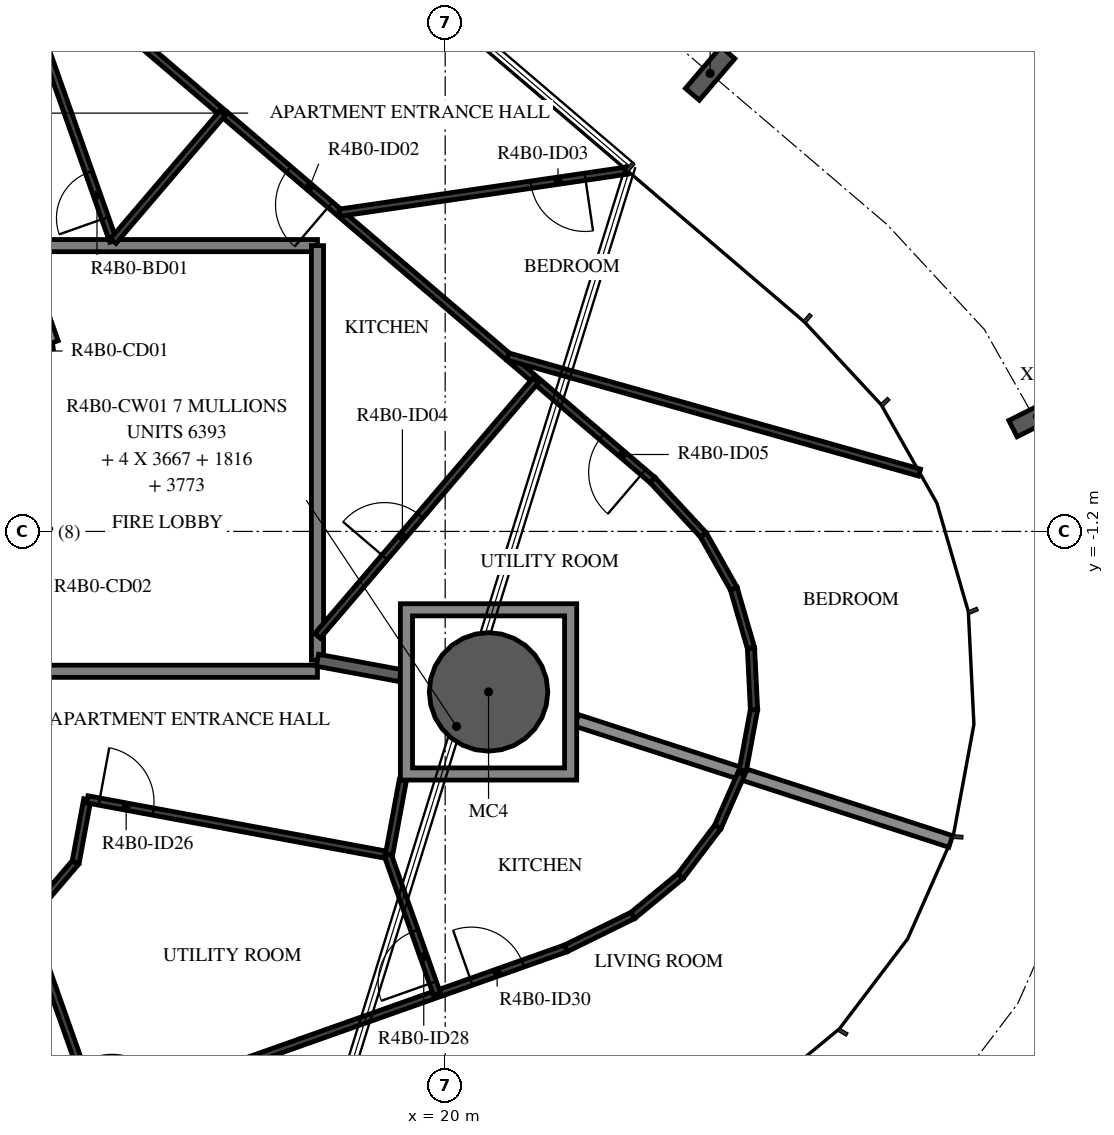
"""IFC4 building model, lengths in metres.
Left out: names, types, materials, properties, quantities, classifications, styles, units other than length and angle.
Written with IfcOpenShell. Run it as: python <this file> out.ifc"""

import sys

from ifc_helpers import new_model, si_unit, direction, frame, frame_2d, origin, origin_2d, place, context, subcontext, project, spatial, polyline, rectangle, hollow_circle, i_section, outline, extrude, element, fill, save


model = new_model("IFC4")
c1 = context("Model", 3, precision=1e-05, world=origin(), true_north=direction((0.0, 1.0)))
c2 = subcontext(c1, "Body", "Model", "MODEL_VIEW")
j1 = project(units=[si_unit("LENGTHUNIT", "METRE"), si_unit("PLANEANGLEUNIT", "RADIAN")], contexts=[c1])
p1 = place(None, origin())
s1 = spatial("IfcSite", under=j1, at=p1, CompositionType="ELEMENT")
p2 = place(p1, origin())
s2 = spatial("IfcBuilding", under=s1, at=p2, CompositionType="ELEMENT")
p3 = place(p2, frame((0.0, 0.0, 165.7)))
s3 = spatial("IfcBuildingStorey", under=s2, at=p3, CompositionType="ELEMENT", Elevation=165.7)
p4 = place(p3, frame((20.713, -3.839, -0.38), z_axis=(0.0, 0.0, 1.0), x_axis=(1.0, 0.0, 0.0)))
e1 = element("IfcColumn", 1, at=p4, inside=s3, PredefinedType="COLUMN", context=c2, shape_type="SweptSolid", body=[
    extrude(hollow_circle(Radius=0.975, WallThickness=0.045, at=origin_2d()), origin(), (0.0, 0.0, 1.0), 3.5),
])
for number, where, z_axis, x_axis in (
    (2, (29.74, 0.692, -0.38), (0.0, 0.0, 1.0), (0.449, -0.894, 0.0)),
    (3, (24.358, 6.331, -0.38), (0.0, 0.0, 1.0), (0.76, -0.649, 0.0)),
):
    element("IfcColumn", number, at=place(p3, frame(where, z_axis=z_axis, x_axis=x_axis)), inside=s3, PredefinedType="COLUMN", context=c2, shape_type="SweptSolid", body=[
        extrude(i_section(OverallWidth=0.3, OverallDepth=0.9, WebThickness=0.019, FlangeThickness=0.035, FilletRadius=0.03, at=origin_2d()), origin(), (0.0, 0.0, 1.0), 3.5),
    ])
p5 = place(p3, frame((11.87, 1.668, 0.0), z_axis=(0.0, 0.0, 1.0), x_axis=(0.990270910415, 0.139152879904, 0.0)))
e4 = element("IfcWall", 4, at=p5, inside=s3, PredefinedType="STANDARD", context=c2, shape_type="SweptSolid", body=[
    extrude(rectangle(XDim=1.688, YDim=0.2, at=frame_2d((0.844, 0.0))), origin(), (0.0, 0.0, 1.0), 3.12),
])
p6 = place(p5, frame((0.11, 0.0, 0.0)))
e5 = element("IfcOpeningElement", 5, at=p6, cuts=e4, PredefinedType="OPENING", context=c2, shape_type="SweptSolid", body=[
    extrude(rectangle(XDim=1.2, YDim=2.1, at=frame_2d((0.6, 1.05))), frame((0.0, 0.11, 0.0), z_axis=(0.0, -1.0, 0.0), x_axis=(1.0, 0.0, 0.0)), (0.0, 0.0, 1.0), 0.22),
])
p7 = place(p3, frame((13.542, 1.903, 0.0), z_axis=(0.0, 0.0, 1.0), x_axis=(-0.333808508206, 0.942640907159, 0.0)))
e6 = element("IfcWall", 6, at=p7, inside=s3, PredefinedType="STANDARD", context=c2, shape_type="SweptSolid", body=[
    extrude(rectangle(XDim=6.317, YDim=0.2, at=frame_2d((3.158, 0.0))), origin(), (0.0, 0.0, 1.0), 3.12),
])
p8 = place(p3, frame((17.9, 3.5, 0.0), z_axis=(0.0, 0.0, 1.0), x_axis=(-1.0, 0.0, 0.0)))
e7 = element("IfcWall", 7, at=p8, inside=s3, PredefinedType="STANDARD", context=c2, shape_type="SweptSolid", body=[
    extrude(rectangle(XDim=4.924, YDim=0.2, at=frame_2d((2.462, 0.0))), origin(), (0.0, 0.0, 1.0), 3.12),
])
p9 = place(p3, frame((17.9, -3.318, 0.0), z_axis=(0.0, 0.0, 1.0), x_axis=(0.0, 1.0, 0.0)))
e8 = element("IfcWall", 8, at=p9, inside=s3, PredefinedType="STANDARD", context=c2, shape_type="SweptSolid", body=[
    extrude(rectangle(XDim=6.818, YDim=0.2, at=frame_2d((3.409, 0.0))), origin(), (0.0, 0.0, 1.0), 3.12),
])
p10 = place(p3, frame((12.979, -3.5, 0.0), z_axis=(0.0, 0.0, 1.0), x_axis=(1.0, 0.0, 0.0)))
e9 = element("IfcWall", 9, at=p10, inside=s3, PredefinedType="STANDARD", context=c2, shape_type="SweptSolid", body=[
    extrude(rectangle(XDim=4.92, YDim=0.2, at=frame_2d((2.46, 0.0))), origin(), (0.0, 0.0, 1.0), 3.12),
])
p11 = place(p3, frame((17.9, -3.319, 0.0), z_axis=(0.0, 0.0, 1.0), x_axis=(0.983246950753, -0.182278451375, 0.0)))
e10 = element("IfcWall", 10, at=p11, inside=s3, PredefinedType="STANDARD", context=c2, shape_type="SweptSolid", body=[
    extrude(rectangle(XDim=1.386, YDim=0.2, at=frame_2d((0.693, 0.0))), origin(), (0.0, 0.0, 1.0), 3.12),
])
p12 = place(p3, frame((22.163, -4.308, 0.0), z_axis=(0.0, 0.0, 1.0), x_axis=(0.951422718769, -0.307887658426, 0.0)))
e11 = element("IfcWall", 11, at=p12, inside=s3, PredefinedType="STANDARD", context=c2, shape_type="SweptSolid", body=[
    extrude(rectangle(XDim=6.464, YDim=0.2, at=frame_2d((3.232, 0.0))), origin(), (0.0, 0.0, 1.0), 2.73),
])
p13 = place(p3, frame((14.541, 3.575, 0.0), z_axis=(0.0, 0.0, 1.0), x_axis=(-0.333799280318, 0.942644174893, 0.0)))
e12 = element("IfcWall", 12, at=p13, inside=s3, PredefinedType="PARTITIONING", context=c2, shape_type="SweptSolid", body=[
    extrude(rectangle(XDim=5.477, YDim=0.12, at=frame_2d((2.738, 0.0))), origin(), (0.0, 0.0, 1.0), 3.12),
])
p14 = place(p13, frame((0.4, 0.0, 0.0)))
e13 = element("IfcOpeningElement", 13, at=p14, cuts=e12, PredefinedType="OPENING", context=c2, shape_type="SweptSolid", body=[
    extrude(rectangle(XDim=0.8, YDim=2.1, at=frame_2d((0.4, 1.05))), frame((0.0, 0.07, 0.0), z_axis=(0.0, -1.0, 0.0), x_axis=(1.0, 0.0, 0.0)), (0.0, 0.0, 1.0), 0.14),
])
p15 = place(p3, frame((12.734, 8.762, 0.0), z_axis=(0.0, 0.0, 1.0), x_axis=(0.760390484255, -0.649466174219, 0.0)))
e14 = element("IfcWall", 14, at=p15, inside=s3, PredefinedType="PARTITIONING", context=c2, shape_type="SweptSolid", body=[
    extrude(rectangle(XDim=4.783, YDim=0.12, at=frame_2d((2.391, 0.0))), origin(), (0.0, 0.0, 1.0), 3.12),
])
p16 = place(p3, frame((23.411, -0.357, 0.0), z_axis=(0.0, 0.0, 1.0), x_axis=(-0.76041871148, 0.649433124525, 0.0)))
e15 = element("IfcWall", 15, at=p16, inside=s3, PredefinedType="PARTITIONING", context=c2, shape_type="SweptSolid", body=[
    extrude(rectangle(XDim=9.259, YDim=0.12, at=frame_2d((4.629, 0.0))), origin(), (0.0, 0.0, 1.0), 3.12),
])
p17 = place(p16, frame((6.972, 0.0, 0.0)))
e16 = element("IfcOpeningElement", 16, at=p17, cuts=e15, PredefinedType="OPENING", context=c2, shape_type="SweptSolid", body=[
    extrude(rectangle(XDim=0.9, YDim=2.1, at=frame_2d((0.45, 1.05))), frame((0.0, 0.07, 0.0), z_axis=(0.0, -1.0, 0.0), x_axis=(1.0, 0.0, 0.0)), (0.0, 0.0, 1.0), 0.14),
])
p18 = place(p16, frame((0.2, 0.0, 0.0)))
e17 = element("IfcOpeningElement", 17, at=p18, cuts=e15, PredefinedType="OPENING", context=c2, shape_type="SweptSolid", body=[
    extrude(rectangle(XDim=0.9, YDim=2.1, at=frame_2d((0.45, 1.05))), frame((0.0, 0.07, 0.0), z_axis=(0.0, -1.0, 0.0), x_axis=(1.0, 0.0, 0.0)), (0.0, 0.0, 1.0), 0.14),
])
p19 = place(p3, frame((16.341, 5.682, 0.0), z_axis=(0.0, 0.0, 1.0), x_axis=(-0.64946993237, -0.76038727432, 0.0)))
e18 = element("IfcWall", 18, at=p19, inside=s3, PredefinedType="PARTITIONING", context=c2, shape_type="SweptSolid", body=[
    extrude(rectangle(XDim=2.771, YDim=0.12, at=frame_2d((1.386, 0.0))), origin(), (0.0, 0.0, 1.0), 3.12),
])
p20 = place(p3, frame((17.9, -2.918, 0.0), z_axis=(0.0, 0.0, 1.0), x_axis=(0.649469887983, 0.760387312232, 0.0)))
e19 = element("IfcWall", 19, at=p20, inside=s3, PredefinedType="PARTITIONING", context=c2, shape_type="SweptSolid", body=[
    extrude(rectangle(XDim=5.527, YDim=0.12, at=frame_2d((2.763, 0.0))), origin(), (0.0, 0.0, 1.0), 3.12),
])
p21 = place(p20, frame((1.7, 0.0, 0.0)))
e20 = element("IfcOpeningElement", 20, at=p21, cuts=e19, PredefinedType="OPENING", context=c2, shape_type="SweptSolid", body=[
    extrude(rectangle(XDim=0.9, YDim=2.1, at=frame_2d((0.45, 1.05))), frame((0.0, 0.07, 0.0), z_axis=(0.0, -1.0, 0.0), x_axis=(1.0, 0.0, 0.0)), (0.0, 0.0, 1.0), 0.14),
])
p22 = place(p3, frame((22.994, 4.734, 0.0), z_axis=(0.0, 0.0, 1.0), x_axis=(-0.989449286977, -0.144879634529, 0.0)))
e21 = element("IfcWall", 21, at=p22, inside=s3, PredefinedType="PARTITIONING", context=c2, shape_type="SweptSolid", body=[
    extrude(rectangle(XDim=4.782, YDim=0.12, at=frame_2d((2.391, 0.0))), origin(), (0.0, 0.0, 1.0), 3.12),
])
p23 = place(p22, frame((0.7, 0.0, 0.0)))
e22 = element("IfcOpeningElement", 22, at=p23, cuts=e21, PredefinedType="OPENING", context=c2, shape_type="SweptSolid", body=[
    extrude(rectangle(XDim=0.9, YDim=2.1, at=frame_2d((0.45, 1.05))), frame((0.0, 0.07, 0.0), z_axis=(0.0, -1.0, 0.0), x_axis=(1.0, 0.0, 0.0)), (0.0, 0.0, 1.0), 0.14),
])
p24 = place(p3, frame((21.029, 1.677, 0.0), z_axis=(0.0, 0.0, 1.0), x_axis=(0.962458274539, -0.271429677396, 0.0)))
e23 = element("IfcWall", 23, at=p24, inside=s3, PredefinedType="PARTITIONING", context=c2, shape_type="SweptSolid", body=[
    extrude(rectangle(XDim=7.037, YDim=0.12, at=frame_2d((3.519, 0.0))), origin(), (0.0, 0.0, 1.0), 3.12),
])
for number, where, z_axis, x_axis in (
    (24, (24.894, -5.131, 0.0), (0.0, 0.0, 1.0), (0.182, 0.983, 0.0)),
    (25, (25.079, -4.132, 0.0), (0.0, 0.0, 1.0), (-0.049, 0.999, 0.0)),
):
    element("IfcWall", number, at=place(p3, frame(where, z_axis=z_axis, x_axis=x_axis)), inside=s3, PredefinedType="PARTITIONING", context=c2, shape_type="SweptSolid", body=[
        extrude(rectangle(XDim=1.016, YDim=0.12, at=frame_2d((0.508, 0.0))), origin(), (0.0, 0.0, 1.0), 3.12),
    ])
for number, where, z_axis, x_axis in (
    (26, (25.029, -3.117, 0.0), (0.0, 0.0, 1.0), (-0.279, 0.96, 0.0)),
    (27, (24.746, -2.141, 0.0), (0.0, 0.0, 1.0), (-0.492, 0.87, 0.0)),
):
    element("IfcWall", number, at=place(p3, frame(where, z_axis=z_axis, x_axis=x_axis)), inside=s3, PredefinedType="PARTITIONING", context=c2, shape_type="SweptSolid", body=[
        extrude(rectangle(XDim=1.016, YDim=0.12, at=frame_2d((0.508, 0.0))), origin(), (0.0, 0.0, 1.0), 3.12),
    ])
p25 = place(p3, frame((24.246, -1.257, 0.0), z_axis=(0.0, 0.0, 1.0), x_axis=(-0.679840361176, 0.733360132074, 0.0)))
e28 = element("IfcWall", 28, at=p25, inside=s3, PredefinedType="PARTITIONING", context=c2, shape_type="SweptSolid", body=[
    extrude(rectangle(XDim=1.227, YDim=0.12, at=frame_2d((0.614, 0.0))), origin(), (0.0, 0.0, 1.0), 3.12),
])
p26 = place(p3, frame((8.737, -12.713, 0.0), z_axis=(0.0, 0.0, 1.0), x_axis=(0.649430604754, 0.760420863476, 0.0)))
e29 = element("IfcWall", 29, at=p26, inside=s3, PredefinedType="PARTITIONING", context=c2, shape_type="SweptSolid", body=[
    extrude(rectangle(XDim=7.985, YDim=0.12, at=frame_2d((3.992, 0.0))), origin(), (0.0, 0.0, 1.0), 3.12),
])
p27 = place(p26, frame((1.4, 0.0, 0.0)))
e30 = element("IfcOpeningElement", 30, at=p27, cuts=e29, PredefinedType="OPENING", context=c2, shape_type="SweptSolid", body=[
    extrude(rectangle(XDim=0.8, YDim=2.1, at=frame_2d((0.4, 1.05))), frame((0.0, 0.07, 0.0), z_axis=(0.0, -1.0, 0.0), x_axis=(1.0, 0.0, 0.0)), (0.0, 0.0, 1.0), 0.14),
])
p28 = place(p3, frame((13.923, -6.641, 0.0), z_axis=(0.0, 0.0, 1.0), x_axis=(0.182396711264, 0.983225019881, 0.0)))
e31 = element("IfcWall", 31, at=p28, inside=s3, PredefinedType="PARTITIONING", context=c2, shape_type="SweptSolid", body=[
    extrude(rectangle(XDim=1.052, YDim=0.12, at=frame_2d((0.526, 0.0))), origin(), (0.0, 0.0, 1.0), 3.12),
])
p29 = place(p3, frame((14.115, -5.606, 0.0), z_axis=(0.0, 0.0, 1.0), x_axis=(0.983252350103, -0.182249323775, 0.0)))
e32 = element("IfcWall", 32, at=p29, inside=s3, PredefinedType="PARTITIONING", context=c2, shape_type="SweptSolid", body=[
    extrude(rectangle(XDim=5.025, YDim=0.12, at=frame_2d((2.512, 0.0))), origin(), (0.0, 0.0, 1.0), 3.12),
])
p30 = place(p29, frame((0.2, 0.0, 0.0)))
e33 = element("IfcOpeningElement", 33, at=p30, cuts=e32, PredefinedType="OPENING", context=c2, shape_type="SweptSolid", body=[
    extrude(rectangle(XDim=0.9, YDim=2.1, at=frame_2d((0.45, 1.05))), frame((0.0, 0.07, 0.0), z_axis=(0.0, -1.0, 0.0), x_axis=(1.0, 0.0, 0.0)), (0.0, 0.0, 1.0), 0.14),
])
p31 = place(p3, frame((19.075, -6.526, 0.0), z_axis=(0.0, 0.0, 1.0), x_axis=(0.182283897093, 0.983245941187, 0.0)))
e34 = element("IfcWall", 34, at=p31, inside=s3, PredefinedType="PARTITIONING", context=c2, shape_type="SweptSolid", body=[
    extrude(rectangle(XDim=1.258, YDim=0.12, at=frame_2d((0.629, 0.0))), origin(), (0.0, 0.0, 1.0), 3.12),
])
p32 = place(p3, frame((14.277, -10.786, 0.0), z_axis=(0.0, 0.0, 1.0), x_axis=(-0.333865646111, 0.942620671504, 0.0)))
e35 = element("IfcWall", 35, at=p32, inside=s3, PredefinedType="PARTITIONING", context=c2, shape_type="SweptSolid", body=[
    extrude(rectangle(XDim=3.419, YDim=0.12, at=frame_2d((1.71, 0.0))), origin(), (0.0, 0.0, 1.0), 3.12),
])
p33 = place(p3, frame((14.239, -10.799, 0.0), z_axis=(0.0, 0.0, 1.0), x_axis=(0.94264202959, 0.333805338558, 0.0)))
e36 = element("IfcWall", 36, at=p33, inside=s3, PredefinedType="PARTITIONING", context=c2, shape_type="SweptSolid", body=[
    extrude(rectangle(XDim=8.216, YDim=0.12, at=frame_2d((4.108, 0.0))), origin(), (0.0, 0.0, 1.0), 3.12),
])
p34 = place(p33, frame((0.3, 0.0, 0.0)))
e37 = element("IfcOpeningElement", 37, at=p34, cuts=e36, PredefinedType="OPENING", context=c2, shape_type="SweptSolid", body=[
    extrude(rectangle(XDim=0.9, YDim=2.1, at=frame_2d((0.45, 1.05))), frame((0.0, 0.07, 0.0), z_axis=(0.0, -1.0, 0.0), x_axis=(1.0, 0.0, 0.0)), (0.0, 0.0, 1.0), 0.14),
])
p35 = place(p33, frame((6.568, 0.0, 0.0)))
e38 = element("IfcOpeningElement", 38, at=p35, cuts=e36, PredefinedType="OPENING", context=c2, shape_type="SweptSolid", body=[
    extrude(rectangle(XDim=0.9, YDim=2.1, at=frame_2d((0.45, 1.05))), frame((0.0, 0.07, 0.0), z_axis=(0.0, -1.0, 0.0), x_axis=(1.0, 0.0, 0.0)), (0.0, 0.0, 1.0), 0.14),
])
p36 = place(p3, frame((19.865, -8.807, 0.0), z_axis=(0.0, 0.0, 1.0), x_axis=(-0.33378934261, 0.942647693871, 0.0)))
e39 = element("IfcWall", 39, at=p36, inside=s3, PredefinedType="PARTITIONING", context=c2, shape_type="SweptSolid", body=[
    extrude(rectangle(XDim=2.424, YDim=0.12, at=frame_2d((1.212, 0.0))), origin(), (0.0, 0.0, 1.0), 3.12),
])
p37 = place(p36, frame((0.2, 0.0, 0.0)))
e40 = element("IfcOpeningElement", 40, at=p37, cuts=e39, PredefinedType="OPENING", context=c2, shape_type="SweptSolid", body=[
    extrude(rectangle(XDim=0.9, YDim=2.1, at=frame_2d((0.45, 1.05))), frame((0.0, 0.07, 0.0), z_axis=(0.0, -1.0, 0.0), x_axis=(1.0, 0.0, 0.0)), (0.0, 0.0, 1.0), 0.14),
])
p38 = place(p3, frame((24.87, -5.184, 0.0), z_axis=(0.0, 0.0, 1.0), x_axis=(-0.404173771344, -0.914682219439, 0.0)))
e41 = element("IfcWall", 41, at=p38, inside=s3, PredefinedType="PARTITIONING", context=c2, shape_type="SweptSolid", body=[
    extrude(rectangle(XDim=0.958, YDim=0.12, at=frame_2d((0.479, 0.0))), origin(), (0.0, 0.0, 1.0), 3.12),
])
for number, where, z_axis, x_axis in (
    (42, (24.483, -6.06, 0.0), (0.0, 0.0, 1.0), (-0.604, -0.797, 0.0)),
    (43, (23.869, -6.869, 0.0), (0.0, 0.0, 1.0), (-0.772, -0.636, 0.0)),
):
    element("IfcWall", number, at=place(p3, frame(where, z_axis=z_axis, x_axis=x_axis)), inside=s3, PredefinedType="PARTITIONING", context=c2, shape_type="SweptSolid", body=[
        extrude(rectangle(XDim=1.016, YDim=0.12, at=frame_2d((0.508, 0.0))), origin(), (0.0, 0.0, 1.0), 3.12),
    ])
p39 = place(p3, frame((23.085, -7.515, 0.0), z_axis=(0.0, 0.0, 1.0), x_axis=(-0.897431337015, -0.441154162786, 0.0)))
e44 = element("IfcWall", 44, at=p39, inside=s3, PredefinedType="PARTITIONING", context=c2, shape_type="SweptSolid", body=[
    extrude(rectangle(XDim=1.227, YDim=0.12, at=frame_2d((0.613, 0.0))), origin(), (0.0, 0.0, 1.0), 3.12),
])
p40 = place(p3, origin())
e45 = element("IfcWall", 45, at=p40, inside=s3, PredefinedType="STANDARD", context=c2, shape_type="SweptSolid", body=[
    extrude(outline(polyline([(22.163, -2.389), (22.163, -5.289), (19.263, -5.289), (19.263, -2.389), (22.163, -2.389)]), holes=[polyline([(19.463, -5.089), (21.963, -5.089), (21.963, -2.589), (19.463, -2.589), (19.463, -5.089)])]), origin(), (0.0, 0.0, 1.0), 3.12),
])
p41 = place(p14, origin())
e46 = element("IfcDoor", 46, at=p41, inside=s3, OperationType="SINGLE_SWING_LEFT", PredefinedType="DOOR", context=c2, shape_type="SweptSolid", body=[
    extrude(rectangle(XDim=0.8, YDim=2.1, at=frame_2d((0.4, 1.05))), frame((0.0, 0.025, 0.0), z_axis=(0.0, -1.0, 0.0), x_axis=(1.0, 0.0, 0.0)), (0.0, 0.0, 1.0), 0.05),
])
fill(e13, e46)
p42 = place(p17, origin())
e47 = element("IfcDoor", 47, at=p42, inside=s3, OperationType="SINGLE_SWING_RIGHT", PredefinedType="DOOR", context=c2, shape_type="SweptSolid", body=[
    extrude(rectangle(XDim=0.9, YDim=2.1, at=frame_2d((0.45, 1.05))), frame((0.0, 0.025, 0.0), z_axis=(0.0, -1.0, 0.0), x_axis=(1.0, 0.0, 0.0)), (0.0, 0.0, 1.0), 0.05),
])
fill(e16, e47)
p43 = place(p23, origin())
e48 = element("IfcDoor", 48, at=p43, inside=s3, OperationType="SINGLE_SWING_LEFT", PredefinedType="DOOR", context=c2, shape_type="SweptSolid", body=[
    extrude(rectangle(XDim=0.9, YDim=2.1, at=frame_2d((0.45, 1.05))), frame((0.0, 0.025, 0.0), z_axis=(0.0, -1.0, 0.0), x_axis=(1.0, 0.0, 0.0)), (0.0, 0.0, 1.0), 0.05),
])
fill(e22, e48)
p44 = place(p21, origin())
e49 = element("IfcDoor", 49, at=p44, inside=s3, OperationType="SINGLE_SWING_LEFT", PredefinedType="DOOR", context=c2, shape_type="SweptSolid", body=[
    extrude(rectangle(XDim=0.9, YDim=2.1, at=frame_2d((0.45, 1.05))), frame((0.0, 0.025, 0.0), z_axis=(0.0, -1.0, 0.0), x_axis=(1.0, 0.0, 0.0)), (0.0, 0.0, 1.0), 0.05),
])
fill(e20, e49)
p45 = place(p18, origin())
e50 = element("IfcDoor", 50, at=p45, inside=s3, OperationType="SINGLE_SWING_LEFT", PredefinedType="DOOR", context=c2, shape_type="SweptSolid", body=[
    extrude(rectangle(XDim=0.9, YDim=2.1, at=frame_2d((0.45, 1.05))), frame((0.0, 0.025, 0.0), z_axis=(0.0, -1.0, 0.0), x_axis=(1.0, 0.0, 0.0)), (0.0, 0.0, 1.0), 0.05),
])
fill(e17, e50)
p46 = place(p30, origin())
e51 = element("IfcDoor", 51, at=p46, inside=s3, OperationType="SINGLE_SWING_RIGHT", PredefinedType="DOOR", context=c2, shape_type="SweptSolid", body=[
    extrude(rectangle(XDim=0.9, YDim=2.1, at=frame_2d((0.45, 1.05))), frame((0.0, 0.025, 0.0), z_axis=(0.0, -1.0, 0.0), x_axis=(1.0, 0.0, 0.0)), (0.0, 0.0, 1.0), 0.05),
])
fill(e33, e51)
p47 = place(p37, origin())
e52 = element("IfcDoor", 52, at=p47, inside=s3, OperationType="SINGLE_SWING_RIGHT", PredefinedType="DOOR", context=c2, shape_type="SweptSolid", body=[
    extrude(rectangle(XDim=0.9, YDim=2.1, at=frame_2d((0.45, 1.05))), frame((0.0, 0.025, 0.0), z_axis=(0.0, -1.0, 0.0), x_axis=(1.0, 0.0, 0.0)), (0.0, 0.0, 1.0), 0.05),
])
fill(e40, e52)
p48 = place(p35, origin())
e53 = element("IfcDoor", 53, at=p48, inside=s3, OperationType="SINGLE_SWING_LEFT", PredefinedType="DOOR", context=c2, shape_type="SweptSolid", body=[
    extrude(rectangle(XDim=0.9, YDim=2.1, at=frame_2d((0.45, 1.05))), frame((0.0, 0.025, 0.0), z_axis=(0.0, -1.0, 0.0), x_axis=(1.0, 0.0, 0.0)), (0.0, 0.0, 1.0), 0.05),
])
fill(e38, e53)
save(model, sys.argv[1])
